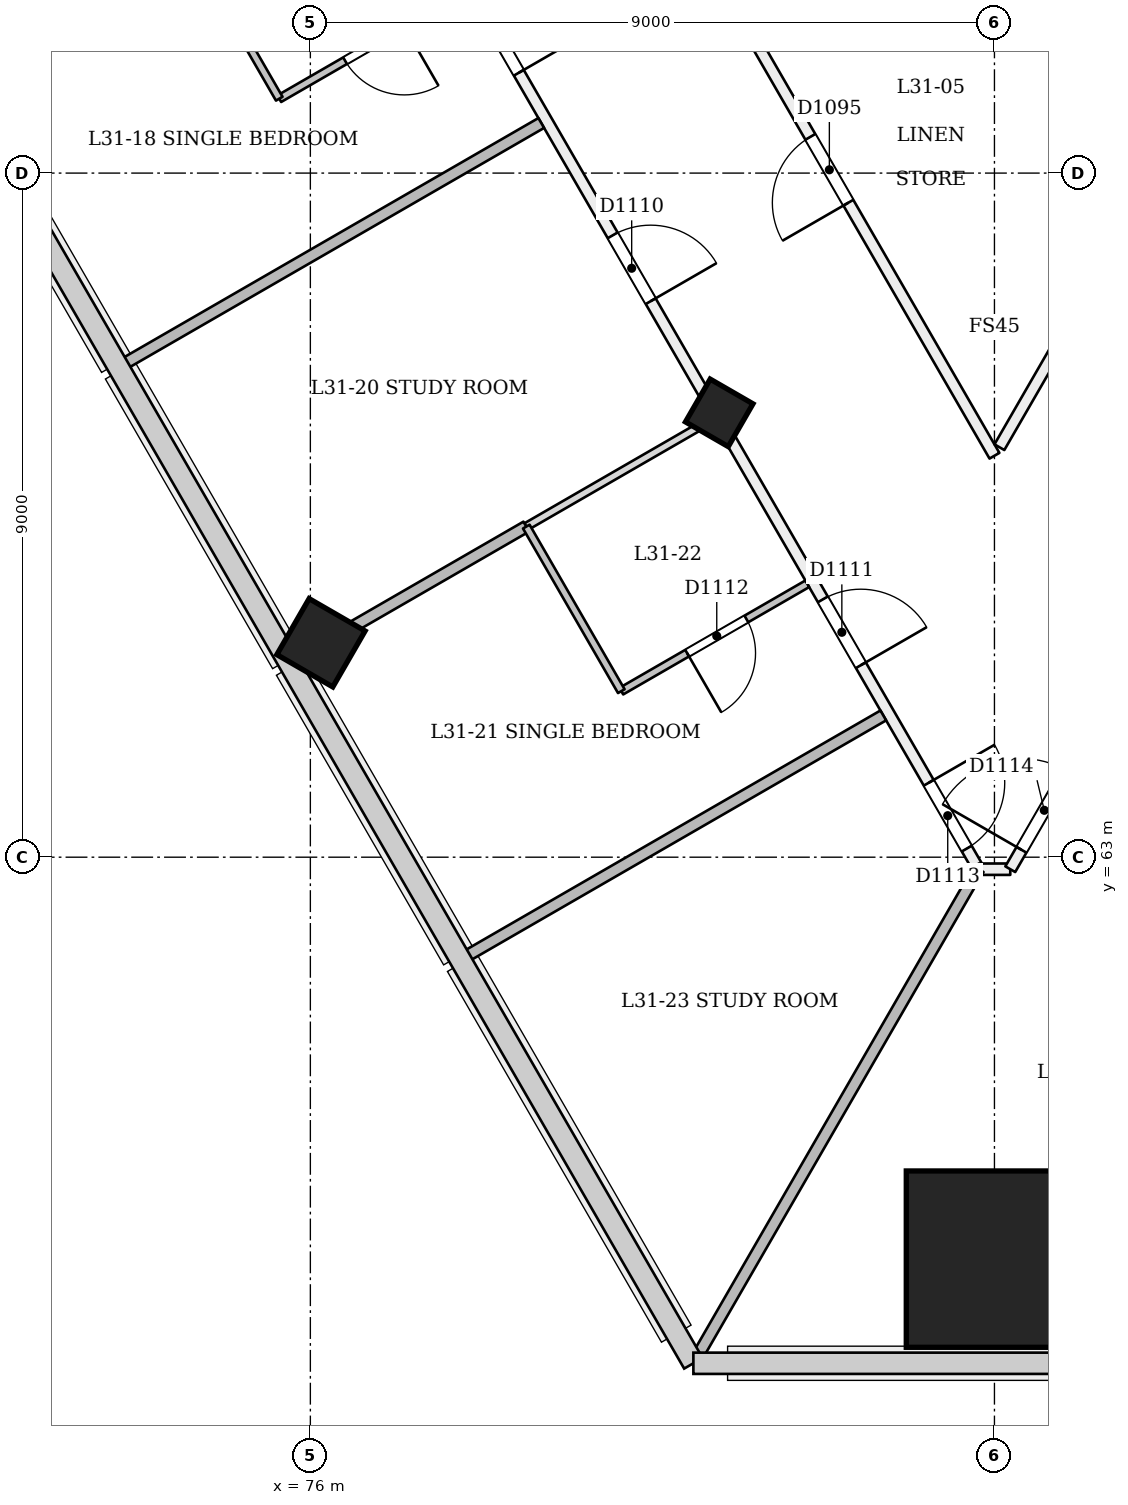
"""IFC4 building model, lengths in metres.
Left out: names, types, materials, properties, quantities, classifications, styles, units other than length and angle.
Written with IfcOpenShell. Run it as: python <this file> out.ifc"""

import sys

from ifc_helpers import new_model, si_unit, direction, frame, frame_2d, origin, origin_2d, place, context, subcontext, project, spatial, rectangle, extrude, element, fill, save


model = new_model("IFC4")
c1 = context("Model", 3, precision=1e-05, world=origin(), true_north=direction((0.0, 1.0)))
c2 = subcontext(c1, "Body", "Model", "MODEL_VIEW")
j1 = project(units=[si_unit("LENGTHUNIT", "METRE"), si_unit("PLANEANGLEUNIT", "RADIAN")], contexts=[c1])
p1 = place(None, origin())
s1 = spatial("IfcSite", under=j1, at=p1, CompositionType="ELEMENT")
p2 = place(p1, origin())
s2 = spatial("IfcBuilding", under=s1, at=p2, CompositionType="ELEMENT")
p3 = place(p2, frame((0.0, 0.0, 124.2)))
s3 = spatial("IfcBuildingStorey", under=s2, at=p3, CompositionType="ELEMENT", Elevation=124.2)
p4 = place(p3, frame((81.352, 68.799, -0.02), z_axis=(0.02222134892, 0.038480872521, 0.999012229206), x_axis=(-0.865643652647, -0.499179479521, 0.038482643594)))
e1 = element("IfcColumn", 1, at=p4, inside=s3, PredefinedType="COLUMN", context=c2, shape_type="SweptSolid", body=[
    extrude(rectangle(XDim=0.65, YDim=0.65, at=origin_2d()), origin(), (0.0, 0.0, 1.0), 3.604),
])
p5 = place(p3, frame((85.0, 57.642, 0.0), z_axis=(0.0, 0.058289438722, 0.9982997252), x_axis=(-1.0, 0.0, 0.0)))
e2 = element("IfcColumn", 2, at=p5, inside=s3, PredefinedType="COLUMN", context=c2, shape_type="SweptSolid", body=[
    extrude(rectangle(XDim=2.32, YDim=2.32, at=origin_2d()), origin(), (0.0, 0.0, 1.0), 3.606),
])
p6 = place(p3, frame((76.112, 65.773, -0.026), z_axis=(0.022222910879, 0.038415824599, 0.999014697916), x_axis=(-0.866025550624, -0.498520341777, 0.03843454828)))
e3 = element("IfcColumn", 3, at=p6, inside=s3, PredefinedType="COLUMN", context=c2, shape_type="SweptSolid", body=[
    extrude(rectangle(XDim=0.85, YDim=0.85, at=origin_2d()), origin(), (0.0, 0.0, 1.0), 3.604),
])
p7 = place(p3, frame((85.0, 68.281, 0.0), z_axis=(0.0, 0.0, 1.0), x_axis=(-0.49999744999, 0.866026876029, 0.0)))
e4 = element("IfcWall", 4, at=p7, inside=s3, PredefinedType="PARTITIONING", context=c2, shape_type="SweptSolid", body=[
    extrude(rectangle(XDim=25.309, YDim=0.15, at=frame_2d((12.655, 0.0))), origin(), (0.0, 0.0, 1.0), 3.15),
])
p8 = place(p7, frame((18.107, 0.0, 0.0)))
e5 = element("IfcOpeningElement", 5, at=p8, cuts=e4, PredefinedType="OPENING", context=c2, shape_type="SweptSolid", body=[
    extrude(rectangle(XDim=0.9, YDim=2.1, at=frame_2d((0.45, 1.05))), frame((0.0, 0.085, 0.0), z_axis=(0.0, -1.0, 0.0), x_axis=(1.0, 0.0, 0.0)), (0.0, 0.0, 1.0), 0.171),
])
p9 = place(p7, frame((22.843, 0.0, 0.0)))
e6 = element("IfcOpeningElement", 6, at=p9, cuts=e4, PredefinedType="OPENING", context=c2, shape_type="SweptSolid", body=[
    extrude(rectangle(XDim=1.0, YDim=2.1, at=frame_2d((0.5, 1.05))), frame((0.0, 0.085, 0.0), z_axis=(0.0, -1.0, 0.0), x_axis=(1.0, 0.0, 0.0)), (0.0, 0.0, 1.0), 0.171),
])
p10 = place(p7, frame((3.844, 0.0, 0.0)))
e7 = element("IfcOpeningElement", 7, at=p10, cuts=e4, PredefinedType="OPENING", context=c2, shape_type="SweptSolid", body=[
    extrude(rectangle(XDim=1.0, YDim=2.1, at=frame_2d((0.5, 1.05))), frame((0.0, 0.085, 0.0), z_axis=(0.0, -1.0, 0.0), x_axis=(1.0, 0.0, 0.0)), (0.0, 0.0, 1.0), 0.171),
])
p11 = place(p7, frame((13.184, 0.0, 0.0)))
e8 = element("IfcOpeningElement", 8, at=p11, cuts=e4, PredefinedType="OPENING", context=c2, shape_type="SweptSolid", body=[
    extrude(rectangle(XDim=1.0, YDim=2.1, at=frame_2d((0.5, 1.05))), frame((0.0, 0.085, 0.0), z_axis=(0.0, -1.0, 0.0), x_axis=(1.0, 0.0, 0.0)), (0.0, 0.0, 1.0), 0.171),
])
p12 = place(p3, frame((97.655, 90.2, 0.0), z_axis=(0.0, 0.0, 1.0), x_axis=(-0.5000058613, -0.866022019735, 0.0)))
e9 = element("IfcWall", 9, at=p12, inside=s3, PredefinedType="PARTITIONING", context=c2, shape_type="SweptSolid", body=[
    extrude(rectangle(XDim=25.179, YDim=0.15, at=frame_2d((12.59, 0.0))), origin(), (0.0, 0.0, 1.0), 3.15),
])
p13 = place(p12, frame((11.939, 0.0, 0.0)))
e10 = element("IfcOpeningElement", 10, at=p13, cuts=e9, PredefinedType="OPENING", context=c2, shape_type="SweptSolid", body=[
    extrude(rectangle(XDim=1.0, YDim=2.1, at=frame_2d((0.5, 1.05))), frame((0.0, 0.085, 0.0), z_axis=(0.0, -1.0, 0.0), x_axis=(1.0, 0.0, 0.0)), (0.0, 0.0, 1.0), 0.171),
])
p14 = place(p12, frame((7.517, 0.0, 0.0)))
e11 = element("IfcOpeningElement", 11, at=p14, cuts=e9, PredefinedType="OPENING", context=c2, shape_type="SweptSolid", body=[
    extrude(rectangle(XDim=1.0, YDim=2.1, at=frame_2d((0.5, 1.05))), frame((0.0, 0.085, 0.0), z_axis=(0.0, -1.0, 0.0), x_axis=(1.0, 0.0, 0.0)), (0.0, 0.0, 1.0), 0.171),
])
p15 = place(p12, frame((3.271, 0.0, 0.0)))
e12 = element("IfcOpeningElement", 12, at=p15, cuts=e9, PredefinedType="OPENING", context=c2, shape_type="SweptSolid", body=[
    extrude(rectangle(XDim=1.0, YDim=2.1, at=frame_2d((0.5, 1.05))), frame((0.0, 0.085, 0.0), z_axis=(0.0, -1.0, 0.0), x_axis=(1.0, 0.0, 0.0)), (0.0, 0.0, 1.0), 0.171),
])
p16 = place(p12, frame((14.95, 0.0, 0.0)))
e13 = element("IfcOpeningElement", 13, at=p16, cuts=e9, PredefinedType="OPENING", context=c2, shape_type="SweptSolid", body=[
    extrude(rectangle(XDim=1.0, YDim=2.1, at=frame_2d((0.5, 1.05))), frame((0.0, 0.085, 0.0), z_axis=(0.0, -1.0, 0.0), x_axis=(1.0, 0.0, 0.0)), (0.0, 0.0, 1.0), 0.171),
])
p17 = place(p12, frame((18.033, 0.0, 0.0)))
e14 = element("IfcOpeningElement", 14, at=p17, cuts=e9, PredefinedType="OPENING", context=c2, shape_type="SweptSolid", body=[
    extrude(rectangle(XDim=1.0, YDim=2.1, at=frame_2d((0.5, 1.05))), frame((0.0, 0.085, 0.0), z_axis=(0.0, -1.0, 0.0), x_axis=(1.0, 0.0, 0.0)), (0.0, 0.0, 1.0), 0.171),
])
p18 = place(p3, frame((64.413, 98.139, 0.0), z_axis=(0.0, 0.0, 1.0), x_axis=(0.500003831119, -0.866023191876, 0.0)))
e15 = element("IfcWall", 15, at=p18, inside=s3, PredefinedType="PARTITIONING", context=c2, shape_type="SweptSolid", body=[
    extrude(rectangle(XDim=40.758, YDim=0.15, at=frame_2d((20.379, 0.0))), origin(), (0.0, 0.0, 1.0), 2.75),
])
p19 = place(p18, frame((0.2, 0.0, 0.0)))
e16 = element("IfcOpeningElement", 16, at=p19, cuts=e15, PredefinedType="OPENING", context=c2, shape_type="SweptSolid", body=[
    extrude(rectangle(XDim=1.2, YDim=2.1, at=frame_2d((0.6, 1.05))), frame((0.0, 0.085, 0.0), z_axis=(0.0, -1.0, 0.0), x_axis=(1.0, 0.0, 0.0)), (0.0, 0.0, 1.0), 0.171),
])
p20 = place(p18, frame((3.099, 0.0, 0.0)))
e17 = element("IfcOpeningElement", 17, at=p20, cuts=e15, PredefinedType="OPENING", context=c2, shape_type="SweptSolid", body=[
    extrude(rectangle(XDim=1.0, YDim=2.1, at=frame_2d((0.5, 1.05))), frame((0.0, 0.085, 0.0), z_axis=(0.0, -1.0, 0.0), x_axis=(1.0, 0.0, 0.0)), (0.0, 0.0, 1.0), 0.171),
])
p21 = place(p18, frame((9.774, 0.0, 0.0)))
e18 = element("IfcOpeningElement", 18, at=p21, cuts=e15, PredefinedType="OPENING", context=c2, shape_type="SweptSolid", body=[
    extrude(rectangle(XDim=1.0, YDim=2.1, at=frame_2d((0.5, 1.05))), frame((0.0, 0.085, 0.0), z_axis=(0.0, -1.0, 0.0), x_axis=(1.0, 0.0, 0.0)), (0.0, 0.0, 1.0), 0.171),
])
p22 = place(p18, frame((11.984, 0.0, 0.0)))
e19 = element("IfcOpeningElement", 19, at=p22, cuts=e15, PredefinedType="OPENING", context=c2, shape_type="SweptSolid", body=[
    extrude(rectangle(XDim=1.0, YDim=2.1, at=frame_2d((0.5, 1.05))), frame((0.0, 0.085, 0.0), z_axis=(0.0, -1.0, 0.0), x_axis=(1.0, 0.0, 0.0)), (0.0, 0.0, 1.0), 0.171),
])
p23 = place(p18, frame((18.659, 0.0, 0.0)))
e20 = element("IfcOpeningElement", 20, at=p23, cuts=e15, PredefinedType="OPENING", context=c2, shape_type="SweptSolid", body=[
    extrude(rectangle(XDim=1.0, YDim=2.1, at=frame_2d((0.5, 1.05))), frame((0.0, 0.085, 0.0), z_axis=(0.0, -1.0, 0.0), x_axis=(1.0, 0.0, 0.0)), (0.0, 0.0, 1.0), 0.171),
])
p24 = place(p18, frame((22.129, 0.0, 0.0)))
e21 = element("IfcOpeningElement", 21, at=p24, cuts=e15, PredefinedType="OPENING", context=c2, shape_type="SweptSolid", body=[
    extrude(rectangle(XDim=1.0, YDim=2.1, at=frame_2d((0.5, 1.05))), frame((0.0, 0.085, 0.0), z_axis=(0.0, -1.0, 0.0), x_axis=(1.0, 0.0, 0.0)), (0.0, 0.0, 1.0), 0.171),
])
p25 = place(p18, frame((27.659, 0.0, 0.0)))
e22 = element("IfcOpeningElement", 22, at=p25, cuts=e15, PredefinedType="OPENING", context=c2, shape_type="SweptSolid", body=[
    extrude(rectangle(XDim=1.0, YDim=2.1, at=frame_2d((0.5, 1.05))), frame((0.0, 0.085, 0.0), z_axis=(0.0, -1.0, 0.0), x_axis=(1.0, 0.0, 0.0)), (0.0, 0.0, 1.0), 0.171),
])
p26 = place(p18, frame((31.129, 0.0, 0.0)))
e23 = element("IfcOpeningElement", 23, at=p26, cuts=e15, PredefinedType="OPENING", context=c2, shape_type="SweptSolid", body=[
    extrude(rectangle(XDim=1.0, YDim=2.1, at=frame_2d((0.5, 1.05))), frame((0.0, 0.085, 0.0), z_axis=(0.0, -1.0, 0.0), x_axis=(1.0, 0.0, 0.0)), (0.0, 0.0, 1.0), 0.171),
])
p27 = place(p18, frame((36.659, 0.0, 0.0)))
e24 = element("IfcOpeningElement", 24, at=p27, cuts=e15, PredefinedType="OPENING", context=c2, shape_type="SweptSolid", body=[
    extrude(rectangle(XDim=1.0, YDim=2.1, at=frame_2d((0.5, 1.05))), frame((0.0, 0.085, 0.0), z_axis=(0.0, -1.0, 0.0), x_axis=(1.0, 0.0, 0.0)), (0.0, 0.0, 1.0), 0.171),
])
p28 = place(p18, frame((39.445, 0.0, 0.0)))
e25 = element("IfcOpeningElement", 25, at=p28, cuts=e15, PredefinedType="OPENING", context=c2, shape_type="SweptSolid", body=[
    extrude(rectangle(XDim=1.0, YDim=2.1, at=frame_2d((0.5, 1.05))), frame((0.0, 0.085, 0.0), z_axis=(0.0, -1.0, 0.0), x_axis=(1.0, 0.0, 0.0)), (0.0, 0.0, 1.0), 0.171),
])
p29 = place(p3, frame((84.792, 62.842, 0.0), z_axis=(0.0, 0.0, 1.0), x_axis=(1.0, 0.0, 0.0)))
e26 = element("IfcWall", 26, at=p29, inside=s3, PredefinedType="PARTITIONING", context=c2, shape_type="SweptSolid", body=[
    extrude(rectangle(XDim=0.416, YDim=0.15, at=frame_2d((0.208, 0.0))), origin(), (0.0, 0.0, 1.0), 3.15),
])
p30 = place(p3, frame((85.208, 62.842, 0.0), z_axis=(0.0, 0.0, 1.0), x_axis=(0.499999338616, 0.866025785634, 0.0)))
e27 = element("IfcWall", 27, at=p30, inside=s3, PredefinedType="PARTITIONING", context=c2, shape_type="SweptSolid", body=[
    extrude(rectangle(XDim=40.758, YDim=0.15, at=frame_2d((20.379, 0.0))), origin(), (0.0, 0.0, 1.0), 2.75),
])
p31 = place(p30, frame((0.295, 0.0, 0.0)))
e28 = element("IfcOpeningElement", 28, at=p31, cuts=e27, PredefinedType="OPENING", context=c2, shape_type="SweptSolid", body=[
    extrude(rectangle(XDim=1.2, YDim=2.1, at=frame_2d((0.6, 1.05))), frame((0.0, 0.085, 0.0), z_axis=(0.0, -1.0, 0.0), x_axis=(1.0, 0.0, 0.0)), (0.0, 0.0, 1.0), 0.171),
])
p32 = place(p30, frame((4.129, 0.0, 0.0)))
e29 = element("IfcOpeningElement", 29, at=p32, cuts=e27, PredefinedType="OPENING", context=c2, shape_type="SweptSolid", body=[
    extrude(rectangle(XDim=1.0, YDim=2.1, at=frame_2d((0.5, 1.05))), frame((0.0, 0.085, 0.0), z_axis=(0.0, -1.0, 0.0), x_axis=(1.0, 0.0, 0.0)), (0.0, 0.0, 1.0), 0.171),
])
p33 = place(p30, frame((9.659, 0.0, 0.0)))
e30 = element("IfcOpeningElement", 30, at=p33, cuts=e27, PredefinedType="OPENING", context=c2, shape_type="SweptSolid", body=[
    extrude(rectangle(XDim=1.0, YDim=2.1, at=frame_2d((0.5, 1.05))), frame((0.0, 0.085, 0.0), z_axis=(0.0, -1.0, 0.0), x_axis=(1.0, 0.0, 0.0)), (0.0, 0.0, 1.0), 0.171),
])
p34 = place(p30, frame((11.984, 0.0, 0.0)))
e31 = element("IfcOpeningElement", 31, at=p34, cuts=e27, PredefinedType="OPENING", context=c2, shape_type="SweptSolid", body=[
    extrude(rectangle(XDim=1.0, YDim=2.1, at=frame_2d((0.5, 1.05))), frame((0.0, 0.085, 0.0), z_axis=(0.0, -1.0, 0.0), x_axis=(1.0, 0.0, 0.0)), (0.0, 0.0, 1.0), 0.171),
])
p35 = place(p30, frame((18.774, 0.0, 0.0)))
e32 = element("IfcOpeningElement", 32, at=p35, cuts=e27, PredefinedType="OPENING", context=c2, shape_type="SweptSolid", body=[
    extrude(rectangle(XDim=1.0, YDim=2.1, at=frame_2d((0.5, 1.05))), frame((0.0, 0.085, 0.0), z_axis=(0.0, -1.0, 0.0), x_axis=(1.0, 0.0, 0.0)), (0.0, 0.0, 1.0), 0.171),
])
p36 = place(p30, frame((21.099, 0.0, 0.0)))
e33 = element("IfcOpeningElement", 33, at=p36, cuts=e27, PredefinedType="OPENING", context=c2, shape_type="SweptSolid", body=[
    extrude(rectangle(XDim=1.0, YDim=2.1, at=frame_2d((0.5, 1.05))), frame((0.0, 0.085, 0.0), z_axis=(0.0, -1.0, 0.0), x_axis=(1.0, 0.0, 0.0)), (0.0, 0.0, 1.0), 0.171),
])
p37 = place(p30, frame((27.659, 0.0, 0.0)))
e34 = element("IfcOpeningElement", 34, at=p37, cuts=e27, PredefinedType="OPENING", context=c2, shape_type="SweptSolid", body=[
    extrude(rectangle(XDim=1.0, YDim=2.1, at=frame_2d((0.5, 1.05))), frame((0.0, 0.085, 0.0), z_axis=(0.0, -1.0, 0.0), x_axis=(1.0, 0.0, 0.0)), (0.0, 0.0, 1.0), 0.171),
])
p38 = place(p30, frame((30.099, 0.0, 0.0)))
e35 = element("IfcOpeningElement", 35, at=p38, cuts=e27, PredefinedType="OPENING", context=c2, shape_type="SweptSolid", body=[
    extrude(rectangle(XDim=1.0, YDim=2.1, at=frame_2d((0.5, 1.05))), frame((0.0, 0.085, 0.0), z_axis=(0.0, -1.0, 0.0), x_axis=(1.0, 0.0, 0.0)), (0.0, 0.0, 1.0), 0.171),
])
p39 = place(p30, frame((39.358, 0.0, 0.0)))
e36 = element("IfcOpeningElement", 36, at=p39, cuts=e27, PredefinedType="OPENING", context=c2, shape_type="SweptSolid", body=[
    extrude(rectangle(XDim=1.2, YDim=2.1, at=frame_2d((0.6, 1.05))), frame((0.0, 0.085, 0.0), z_axis=(0.0, -1.0, 0.0), x_axis=(1.0, 0.0, 0.0)), (0.0, 0.0, 1.0), 0.171),
])
p40 = place(p3, frame((87.553, 72.853, 0.0), z_axis=(0.0, 0.0, 1.0), x_axis=(-0.866016719094, 0.500015042024, 0.0)))
e37 = element("IfcWall", 37, at=p40, inside=s3, PredefinedType="PARTITIONING", context=c2, shape_type="SweptSolid", body=[
    extrude(rectangle(XDim=8.475, YDim=0.15, at=frame_2d((4.237, 0.0))), origin(), (0.0, 0.0, 1.0), 3.15),
])
p41 = place(p3, frame((71.31, 73.394, 0.0), z_axis=(0.0, 0.0, 1.0), x_axis=(0.866015887322, 0.500016482634, 0.0)))
e38 = element("IfcWall", 38, at=p41, inside=s3, PredefinedType="PARTITIONING", context=c2, shape_type="SweptSolid", body=[
    extrude(rectangle(XDim=6.325, YDim=0.1, at=frame_2d((3.163, 0.0))), origin(), (0.0, 0.0, 1.0), 2.65),
])
p42 = place(p3, frame((78.037, 74.391, 0.0), z_axis=(0.0, 0.0, 1.0), x_axis=(-0.866011447264, -0.500024172624, 0.0)))
e39 = element("IfcWall", 39, at=p42, inside=s3, PredefinedType="PARTITIONING", context=c2, shape_type="SweptSolid", body=[
    extrude(rectangle(XDim=2.825, YDim=0.1, at=frame_2d((1.413, 0.0))), origin(), (0.0, 0.0, 1.0), 3.15),
])
p43 = place(p42, frame((0.925, 0.0, 0.0)))
e40 = element("IfcOpeningElement", 40, at=p43, cuts=e39, PredefinedType="OPENING", context=c2, shape_type="SweptSolid", body=[
    extrude(rectangle(XDim=0.9, YDim=2.1, at=frame_2d((0.45, 1.05))), frame((0.0, 0.061, 0.0), z_axis=(0.0, -1.0, 0.0), x_axis=(1.0, 0.0, 0.0)), (0.0, 0.0, 1.0), 0.121),
])
p44 = place(p3, frame((75.591, 72.979, 0.0), z_axis=(0.0, 0.0, 1.0), x_axis=(-0.499943856944, 0.866057815567, 0.0)))
e41 = element("IfcWall", 41, at=p44, inside=s3, PredefinedType="PARTITIONING", context=c2, shape_type="SweptSolid", body=[
    extrude(rectangle(XDim=2.45, YDim=0.1, at=frame_2d((1.225, 0.0))), origin(), (0.0, 0.0, 1.0), 2.75),
])
p45 = place(p3, frame((73.542, 69.486, 0.0), z_axis=(0.0, 0.0, 1.0), x_axis=(0.866025401434, 0.500000004071, 0.0)))
e42 = element("IfcWall", 42, at=p45, inside=s3, PredefinedType="PARTITIONING", context=c2, shape_type="SweptSolid", body=[
    extrude(rectangle(XDim=6.345, YDim=0.15, at=frame_2d((3.173, 0.0))), origin(), (0.0, 0.0, 1.0), 2.65),
])
p46 = place(p3, frame((75.81, 65.599, 0.0), z_axis=(0.0, 0.0, 1.0), x_axis=(0.866019471182, 0.500010275428, 0.0)))
e43 = element("IfcWall", 43, at=p46, inside=s3, PredefinedType="PARTITIONING", context=c2, shape_type="SweptSolid", body=[
    extrude(rectangle(XDim=3.5, YDim=0.15, at=frame_2d((1.75, 0.0))), origin(), (0.0, 0.0, 1.0), 2.65),
])
p47 = place(p3, frame((78.841, 67.349, 0.0), z_axis=(0.0, 0.0, 1.0), x_axis=(0.866011447264, 0.500024172624, 0.0)))
e44 = element("IfcWall", 44, at=p47, inside=s3, PredefinedType="PARTITIONING", context=c2, shape_type="SweptSolid", body=[
    extrude(rectangle(XDim=2.825, YDim=0.1, at=frame_2d((1.413, 0.0))), origin(), (0.0, 0.0, 1.0), 2.75),
])
p48 = place(p3, frame((82.537, 66.597, 0.0), z_axis=(0.0, 0.0, 1.0), x_axis=(-0.866011447264, -0.500024172624, 0.0)))
e45 = element("IfcWall", 45, at=p48, inside=s3, PredefinedType="PARTITIONING", context=c2, shape_type="SweptSolid", body=[
    extrude(rectangle(XDim=2.825, YDim=0.1, at=frame_2d((1.413, 0.0))), origin(), (0.0, 0.0, 1.0), 3.15),
])
p49 = place(p48, frame((0.925, 0.0, 0.0)))
e46 = element("IfcOpeningElement", 46, at=p49, cuts=e45, PredefinedType="OPENING", context=c2, shape_type="SweptSolid", body=[
    extrude(rectangle(XDim=0.9, YDim=2.1, at=frame_2d((0.45, 1.05))), frame((0.0, 0.061, 0.0), z_axis=(0.0, -1.0, 0.0), x_axis=(1.0, 0.0, 0.0)), (0.0, 0.0, 1.0), 0.121),
])
p50 = place(p3, frame((80.091, 65.184, 0.0), z_axis=(0.0, 0.0, 1.0), x_axis=(-0.500004234368, 0.866022959057, 0.0)))
e47 = element("IfcWall", 47, at=p50, inside=s3, PredefinedType="PARTITIONING", context=c2, shape_type="SweptSolid", body=[
    extrude(rectangle(XDim=2.5, YDim=0.1, at=frame_2d((1.25, 0.0))), origin(), (0.0, 0.0, 1.0), 2.75),
])
p51 = place(p3, frame((78.042, 61.692, 0.0), z_axis=(0.0, 0.0, 1.0), x_axis=(0.866025401434, 0.500000004071, 0.0)))
e48 = element("IfcWall", 48, at=p51, inside=s3, PredefinedType="PARTITIONING", context=c2, shape_type="SweptSolid", body=[
    extrude(rectangle(XDim=6.345, YDim=0.15, at=frame_2d((3.173, 0.0))), origin(), (0.0, 0.0, 1.0), 2.65),
])
p52 = place(p3, frame((81.082, 56.417, 0.0), z_axis=(0.0, 0.0, 1.0), x_axis=(0.499993047099, 0.866029418006, 0.0)))
e49 = element("IfcWall", 49, at=p52, inside=s3, PredefinedType="PARTITIONING", context=c2, shape_type="SweptSolid", body=[
    extrude(rectangle(XDim=7.419, YDim=0.15, at=frame_2d((3.71, 0.0))), origin(), (0.0, 0.0, 1.0), 2.65),
])
p53 = place(p10, origin())
e50 = element("IfcDoor", 50, at=p53, inside=s3, OperationType="SINGLE_SWING_LEFT", PredefinedType="NOTDEFINED", context=c2, shape_type="SweptSolid", body=[
    extrude(rectangle(XDim=1.0, YDim=2.1, at=frame_2d((0.5, 1.05))), frame((0.0, 0.025, 0.0), z_axis=(0.0, -1.0, 0.0), x_axis=(1.0, 0.0, 0.0)), (0.0, 0.0, 1.0), 0.05),
])
fill(e7, e50)
p54 = place(p25, origin())
e51 = element("IfcDoor", 51, at=p54, inside=s3, OperationType="SINGLE_SWING_RIGHT", PredefinedType="NOTDEFINED", context=c2, shape_type="SweptSolid", body=[
    extrude(rectangle(XDim=1.0, YDim=2.1, at=frame_2d((0.5, 1.05))), frame((0.0, 0.025, 0.0), z_axis=(0.0, -1.0, 0.0), x_axis=(1.0, 0.0, 0.0)), (0.0, 0.0, 1.0), 0.05),
])
fill(e22, e51)
p55 = place(p43, origin())
e52 = element("IfcDoor", 52, at=p55, inside=s3, OperationType="SINGLE_SWING_LEFT", PredefinedType="NOTDEFINED", context=c2, shape_type="SweptSolid", body=[
    extrude(rectangle(XDim=0.9, YDim=2.1, at=frame_2d((0.45, 1.05))), frame((0.0, 0.025, 0.0), z_axis=(0.0, -1.0, 0.0), x_axis=(1.0, 0.0, 0.0)), (0.0, 0.0, 1.0), 0.05),
])
fill(e40, e52)
p56 = place(p26, origin())
e53 = element("IfcDoor", 53, at=p56, inside=s3, OperationType="SINGLE_SWING_RIGHT", PredefinedType="NOTDEFINED", context=c2, shape_type="SweptSolid", body=[
    extrude(rectangle(XDim=1.0, YDim=2.1, at=frame_2d((0.5, 1.05))), frame((0.0, 0.025, 0.0), z_axis=(0.0, -1.0, 0.0), x_axis=(1.0, 0.0, 0.0)), (0.0, 0.0, 1.0), 0.05),
])
fill(e23, e53)
p57 = place(p27, origin())
e54 = element("IfcDoor", 54, at=p57, inside=s3, OperationType="SINGLE_SWING_RIGHT", PredefinedType="NOTDEFINED", context=c2, shape_type="SweptSolid", body=[
    extrude(rectangle(XDim=1.0, YDim=2.1, at=frame_2d((0.5, 1.05))), frame((0.0, 0.025, 0.0), z_axis=(0.0, -1.0, 0.0), x_axis=(1.0, 0.0, 0.0)), (0.0, 0.0, 1.0), 0.05),
])
fill(e24, e54)
p58 = place(p49, origin())
e55 = element("IfcDoor", 55, at=p58, inside=s3, OperationType="SINGLE_SWING_RIGHT", PredefinedType="NOTDEFINED", context=c2, shape_type="SweptSolid", body=[
    extrude(rectangle(XDim=0.9, YDim=2.1, at=frame_2d((0.45, 1.05))), frame((0.0, 0.025, 0.0), z_axis=(0.0, -1.0, 0.0), x_axis=(1.0, 0.0, 0.0)), (0.0, 0.0, 1.0), 0.05),
])
fill(e46, e55)
p59 = place(p28, origin())
e56 = element("IfcDoor", 56, at=p59, inside=s3, OperationType="SINGLE_SWING_LEFT", PredefinedType="NOTDEFINED", context=c2, shape_type="SweptSolid", body=[
    extrude(rectangle(XDim=1.0, YDim=2.1, at=frame_2d((0.5, 1.05))), frame((0.0, 0.025, 0.0), z_axis=(0.0, -1.0, 0.0), x_axis=(1.0, 0.0, 0.0)), (0.0, 0.0, 1.0), 0.05),
])
fill(e25, e56)
p60 = place(p31, origin())
e57 = element("IfcDoor", 57, at=p60, inside=s3, OperationType="SINGLE_SWING_LEFT", PredefinedType="NOTDEFINED", context=c2, shape_type="SweptSolid", body=[
    extrude(rectangle(XDim=1.2, YDim=2.1, at=frame_2d((0.6, 1.05))), frame((0.0, 0.025, 0.0), z_axis=(0.0, -1.0, 0.0), x_axis=(1.0, 0.0, 0.0)), (0.0, 0.0, 1.0), 0.05),
])
fill(e28, e57)
save(model, sys.argv[1])
